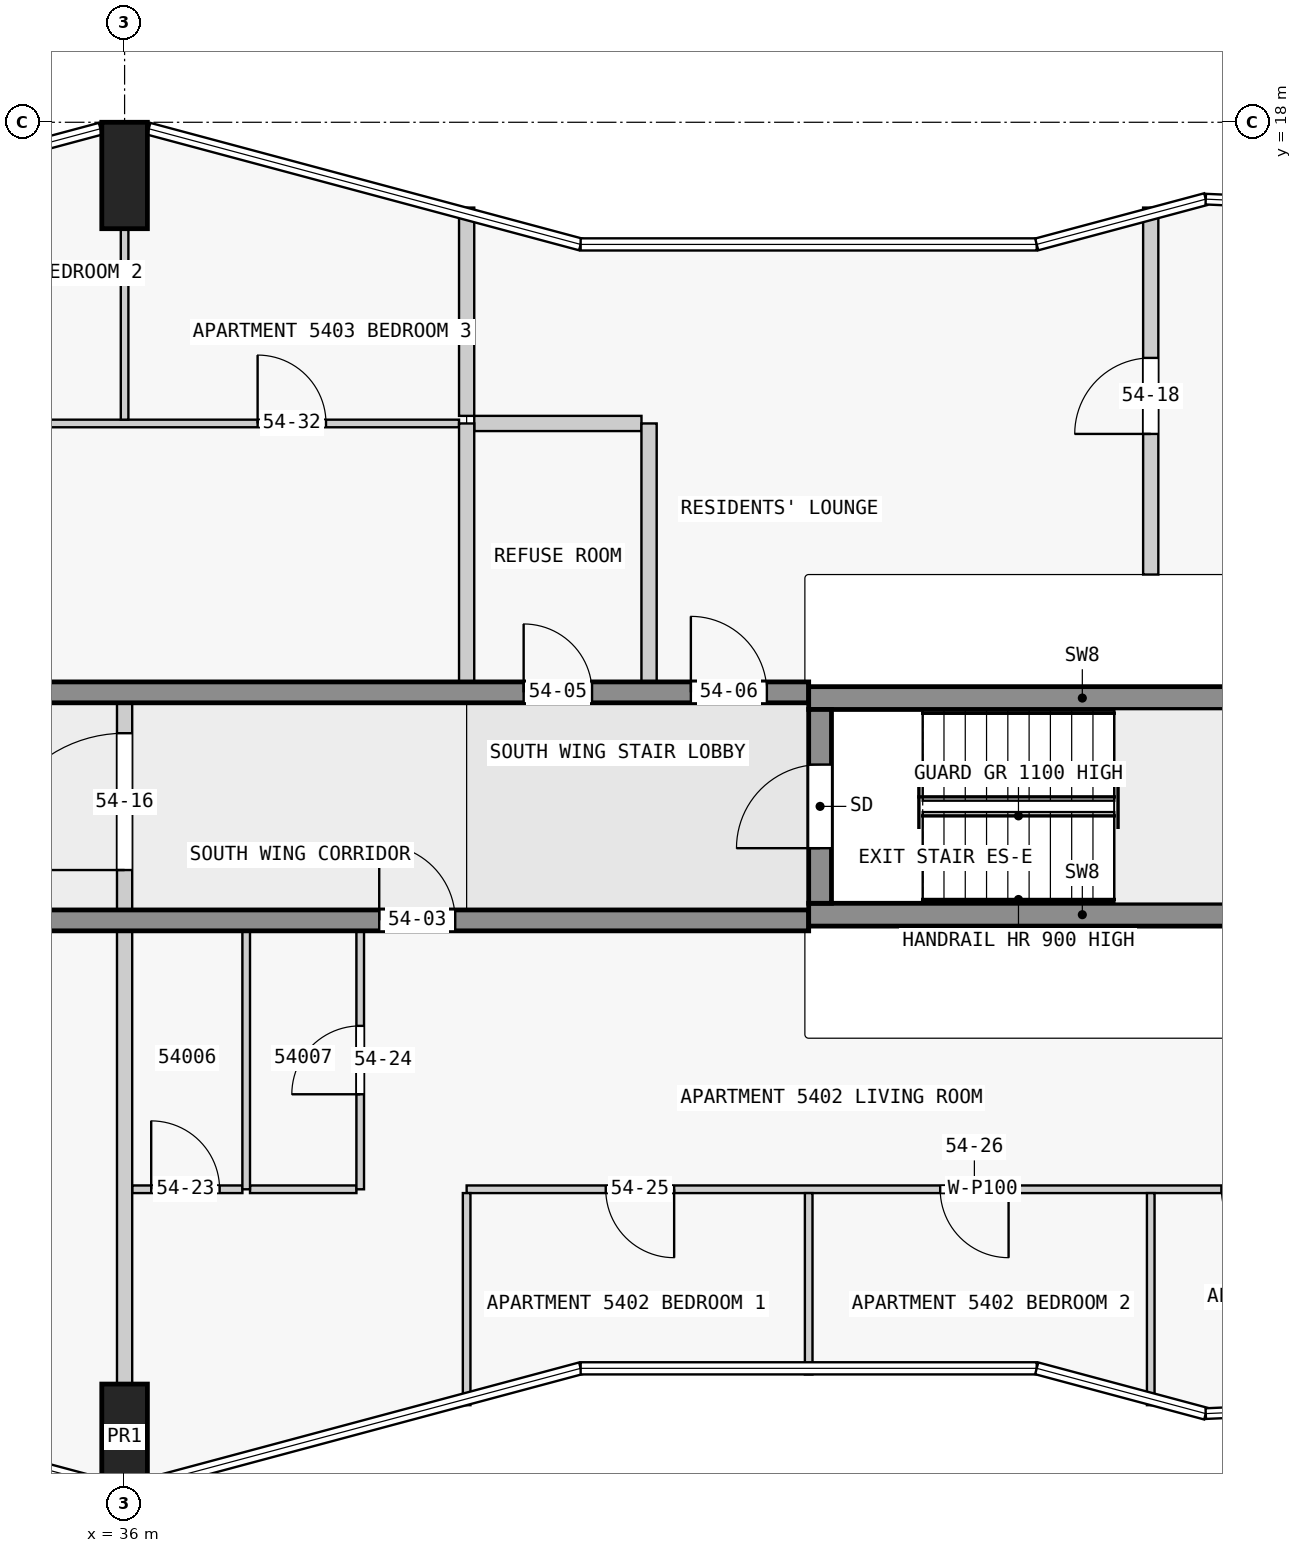
"""IFC4 building model, lengths in metres.
Left out: names, types, materials, properties, quantities, classifications, styles, units other than length and angle.
Written with IfcOpenShell. Run it as: python <this file> out.ifc"""

import sys

from ifc_helpers import new_model, si_unit, direction, frame, frame_2d, origin, origin_2d, place, context, subcontext, project, spatial, rectangle, extrude, element, fill, save


model = new_model("IFC4")
c1 = context("Model", 3, precision=1e-05, world=origin(), true_north=direction((0.0, 1.0)))
c2 = subcontext(c1, "Body", "Model", "MODEL_VIEW")
j1 = project(units=[si_unit("LENGTHUNIT", "METRE"), si_unit("PLANEANGLEUNIT", "RADIAN")], contexts=[c1])
p1 = place(None, origin())
s1 = spatial("IfcSite", under=j1, at=p1, CompositionType="ELEMENT")
p2 = place(p1, origin())
s2 = spatial("IfcBuilding", under=s1, at=p2, CompositionType="ELEMENT")
p3 = place(p2, frame((0.0, 0.0, 208.4)))
s3 = spatial("IfcBuildingStorey", under=s2, at=p3, CompositionType="ELEMENT", Elevation=208.4)
for number, where, z_axis, x_axis in (
    (1, (36.0, 0.7, 0.0), (0.0, 0.0, 1.0), (1.0, 0.0, 0.0)),
    (2, (36.0, 17.3, 0.0), (0.0, 0.0, 1.0), (1.0, 0.0, 0.0)),
):
    element("IfcColumn", number, at=place(p3, frame(where, z_axis=z_axis, x_axis=x_axis)), inside=s3, PredefinedType="COLUMN", context=c2, shape_type="SweptSolid", body=[
        extrude(rectangle(XDim=0.6, YDim=1.4, at=origin_2d()), origin(), (0.0, 0.0, 1.0), 3.5),
    ])
p4 = place(p3, frame((45.15, 7.725, 0.0), z_axis=(0.0, 0.0, 1.0), x_axis=(0.0, 1.0, 0.0)))
e3 = element("IfcWall", 3, at=p4, inside=s3, PredefinedType="SHEAR", context=c2, shape_type="SweptSolid", body=[
    extrude(rectangle(XDim=2.55, YDim=0.3, at=frame_2d((1.275, 0.0))), origin(), (0.0, 0.0, 1.0), 3.5),
])
p5 = place(p4, frame((0.725, 0.0, 0.0)))
e4 = element("IfcOpeningElement", 4, at=p5, cuts=e3, PredefinedType="OPENING", context=c2, shape_type="SweptSolid", body=[
    extrude(rectangle(XDim=1.1, YDim=2.1, at=frame_2d((0.55, 1.05))), frame((0.0, 0.16, 0.0), z_axis=(0.0, -1.0, 0.0), x_axis=(1.0, 0.0, 0.0)), (0.0, 0.0, 1.0), 0.32),
])
for number, where, z_axis, x_axis in (
    (5, (45.0, 7.575, 0.0), (0.0, 0.0, 1.0), (1.0, 0.0, 0.0)),
    (6, (45.0, 10.425, 0.0), (0.0, 0.0, 1.0), (1.0, 0.0, 0.0)),
):
    element("IfcWall", number, at=place(p3, frame(where, z_axis=z_axis, x_axis=x_axis)), inside=s3, PredefinedType="SHEAR", context=c2, shape_type="SweptSolid", body=[
        extrude(rectangle(XDim=7.2, YDim=0.3, at=frame_2d((3.6, 0.0))), origin(), (0.0, 0.0, 1.0), 3.5),
    ])
p6 = place(p3, frame((22.5, 7.5, 0.0), z_axis=(0.0, 0.0, 1.0), x_axis=(1.0, 0.0, 0.0)))
e7 = element("IfcWall", 7, at=p6, inside=s3, PredefinedType="SHEAR", context=c2, shape_type="SweptSolid", body=[
    extrude(rectangle(XDim=22.5, YDim=0.275, at=frame_2d((11.25, 0.0))), origin(), (0.0, 0.0, 1.0), 3.25),
])
p7 = place(p6, frame((4.05, 0.0, 0.0)))
e8 = element("IfcOpeningElement", 8, at=p7, cuts=e7, PredefinedType="OPENING", context=c2, shape_type="SweptSolid", body=[
    extrude(rectangle(XDim=1.0, YDim=2.1, at=frame_2d((0.5, 1.05))), frame((0.0, 0.147, 0.0), z_axis=(0.0, -1.0, 0.0), x_axis=(1.0, 0.0, 0.0)), (0.0, 0.0, 1.0), 0.295),
])
p8 = place(p6, frame((10.35, 0.0, 0.0)))
e9 = element("IfcOpeningElement", 9, at=p8, cuts=e7, PredefinedType="OPENING", context=c2, shape_type="SweptSolid", body=[
    extrude(rectangle(XDim=1.8, YDim=2.1, at=frame_2d((0.9, 1.05))), frame((0.0, 0.147, 0.0), z_axis=(0.0, -1.0, 0.0), x_axis=(1.0, 0.0, 0.0)), (0.0, 0.0, 1.0), 0.295),
])
p9 = place(p6, frame((16.85, 0.0, 0.0)))
e10 = element("IfcOpeningElement", 10, at=p9, cuts=e7, PredefinedType="OPENING", context=c2, shape_type="SweptSolid", body=[
    extrude(rectangle(XDim=1.0, YDim=2.1, at=frame_2d((0.5, 1.05))), frame((0.0, 0.147, 0.0), z_axis=(0.0, -1.0, 0.0), x_axis=(1.0, 0.0, 0.0)), (0.0, 0.0, 1.0), 0.295),
])
p10 = place(p3, frame((22.5, 10.5, 0.0), z_axis=(0.0, 0.0, 1.0), x_axis=(1.0, 0.0, 0.0)))
e11 = element("IfcWall", 11, at=p10, inside=s3, PredefinedType="SHEAR", context=c2, shape_type="SweptSolid", body=[
    extrude(rectangle(XDim=22.5, YDim=0.275, at=frame_2d((11.25, 0.0))), origin(), (0.0, 0.0, 1.0), 3.25),
])
p11 = place(p10, frame((7.75, 0.0, 0.0)))
e12 = element("IfcOpeningElement", 12, at=p11, cuts=e11, PredefinedType="OPENING", context=c2, shape_type="SweptSolid", body=[
    extrude(rectangle(XDim=1.0, YDim=2.1, at=frame_2d((0.5, 1.05))), frame((0.0, 0.147, 0.0), z_axis=(0.0, -1.0, 0.0), x_axis=(1.0, 0.0, 0.0)), (0.0, 0.0, 1.0), 0.295),
])
p12 = place(p10, frame((18.75, 0.0, 0.0)))
e13 = element("IfcOpeningElement", 13, at=p12, cuts=e11, PredefinedType="OPENING", context=c2, shape_type="SweptSolid", body=[
    extrude(rectangle(XDim=0.9, YDim=2.1, at=frame_2d((0.45, 1.05))), frame((0.0, 0.147, 0.0), z_axis=(0.0, -1.0, 0.0), x_axis=(1.0, 0.0, 0.0)), (0.0, 0.0, 1.0), 0.295),
])
p13 = place(p10, frame((20.95, 0.0, 0.0)))
e14 = element("IfcOpeningElement", 14, at=p13, cuts=e11, PredefinedType="OPENING", context=c2, shape_type="SweptSolid", body=[
    extrude(rectangle(XDim=1.0, YDim=2.1, at=frame_2d((0.5, 1.05))), frame((0.0, 0.147, 0.0), z_axis=(0.0, -1.0, 0.0), x_axis=(1.0, 0.0, 0.0)), (0.0, 0.0, 1.0), 0.295),
])
p14 = place(p3, frame((54.08, 3.962, 0.0), z_axis=(0.0, 0.0, 1.0), x_axis=(-1.0, 0.0, 0.0)))
e15 = element("IfcWall", 15, at=p14, inside=s3, PredefinedType="PARTITIONING", context=c2, shape_type="SweptSolid", body=[
    extrude(rectangle(XDim=13.58, YDim=0.1, at=frame_2d((6.79, 0.0))), origin(), (0.0, 0.0, 1.0), 3.25),
])
p15 = place(p14, frame((10.85, 0.0, 0.0)))
e16 = element("IfcOpeningElement", 16, at=p15, cuts=e15, PredefinedType="OPENING", context=c2, shape_type="SweptSolid", body=[
    extrude(rectangle(XDim=0.9, YDim=2.1, at=frame_2d((0.45, 1.05))), frame((0.0, 0.06, 0.0), z_axis=(0.0, -1.0, 0.0), x_axis=(1.0, 0.0, 0.0)), (0.0, 0.0, 1.0), 0.12),
])
p16 = place(p14, frame((6.45, 0.0, 0.0)))
e17 = element("IfcOpeningElement", 17, at=p16, cuts=e15, PredefinedType="OPENING", context=c2, shape_type="SweptSolid", body=[
    extrude(rectangle(XDim=0.9, YDim=2.1, at=frame_2d((0.45, 1.05))), frame((0.0, 0.06, 0.0), z_axis=(0.0, -1.0, 0.0), x_axis=(1.0, 0.0, 0.0)), (0.0, 0.0, 1.0), 0.12),
])
p17 = place(p14, frame((2.75, 0.0, 0.0)))
e18 = element("IfcOpeningElement", 18, at=p17, cuts=e15, PredefinedType="OPENING", context=c2, shape_type="SweptSolid", body=[
    extrude(rectangle(XDim=0.9, YDim=2.1, at=frame_2d((0.45, 1.05))), frame((0.0, 0.06, 0.0), z_axis=(0.0, -1.0, 0.0), x_axis=(1.0, 0.0, 0.0)), (0.0, 0.0, 1.0), 0.12),
])
p18 = place(p3, frame((36.1, 3.962, 0.0), z_axis=(0.0, 0.0, 1.0), x_axis=(1.0, 0.0, 0.0)))
e19 = element("IfcWall", 19, at=p18, inside=s3, PredefinedType="PARTITIONING", context=c2, shape_type="SweptSolid", body=[
    extrude(rectangle(XDim=1.45, YDim=0.1, at=frame_2d((0.725, 0.0))), origin(), (0.0, 0.0, 1.0), 3.25),
])
p19 = place(p18, frame((0.25, 0.0, 0.0)))
e20 = element("IfcOpeningElement", 20, at=p19, cuts=e19, PredefinedType="OPENING", context=c2, shape_type="SweptSolid", body=[
    extrude(rectangle(XDim=0.9, YDim=2.1, at=frame_2d((0.45, 1.05))), frame((0.0, 0.06, 0.0), z_axis=(0.0, -1.0, 0.0), x_axis=(1.0, 0.0, 0.0)), (0.0, 0.0, 1.0), 0.12),
])
p20 = place(p3, frame((37.65, 3.962, 0.0), z_axis=(0.0, 0.0, 1.0), x_axis=(1.0, 0.0, 0.0)))
e21 = element("IfcWall", 21, at=p20, inside=s3, PredefinedType="PARTITIONING", context=c2, shape_type="SweptSolid", body=[
    extrude(rectangle(XDim=1.4, YDim=0.1, at=frame_2d((0.7, 0.0))), origin(), (0.0, 0.0, 1.0), 3.25),
])
p21 = place(p3, frame((27.0, 14.038, 0.0), z_axis=(0.0, 0.0, 1.0), x_axis=(1.0, 0.0, 0.0)))
e22 = element("IfcWall", 22, at=p21, inside=s3, PredefinedType="PARTITIONING", context=c2, shape_type="SweptSolid", body=[
    extrude(rectangle(XDim=13.4, YDim=0.1, at=frame_2d((6.7, 0.0))), origin(), (0.0, 0.0, 1.0), 3.25),
])
p22 = place(p21, frame((1.85, 0.0, 0.0)))
e23 = element("IfcOpeningElement", 23, at=p22, cuts=e22, PredefinedType="OPENING", context=c2, shape_type="SweptSolid", body=[
    extrude(rectangle(XDim=0.9, YDim=2.1, at=frame_2d((0.45, 1.05))), frame((0.0, 0.06, 0.0), z_axis=(0.0, -1.0, 0.0), x_axis=(1.0, 0.0, 0.0)), (0.0, 0.0, 1.0), 0.12),
])
p23 = place(p21, frame((6.35, 0.0, 0.0)))
e24 = element("IfcOpeningElement", 24, at=p23, cuts=e22, PredefinedType="OPENING", context=c2, shape_type="SweptSolid", body=[
    extrude(rectangle(XDim=0.9, YDim=2.1, at=frame_2d((0.45, 1.05))), frame((0.0, 0.06, 0.0), z_axis=(0.0, -1.0, 0.0), x_axis=(1.0, 0.0, 0.0)), (0.0, 0.0, 1.0), 0.12),
])
p24 = place(p21, frame((10.75, 0.0, 0.0)))
e25 = element("IfcOpeningElement", 25, at=p24, cuts=e22, PredefinedType="OPENING", context=c2, shape_type="SweptSolid", body=[
    extrude(rectangle(XDim=0.9, YDim=2.1, at=frame_2d((0.45, 1.05))), frame((0.0, 0.06, 0.0), z_axis=(0.0, -1.0, 0.0), x_axis=(1.0, 0.0, 0.0)), (0.0, 0.0, 1.0), 0.12),
])
p25 = place(p3, frame((42.8, 14.038, 0.0), z_axis=(0.0, 0.0, 1.0), x_axis=(-1.0, 0.0, 0.0)))
e26 = element("IfcWall", 26, at=p25, inside=s3, PredefinedType="PARTITIONING", context=c2, shape_type="SweptSolid", body=[
    extrude(rectangle(XDim=2.2, YDim=0.2, at=frame_2d((1.1, 0.0))), origin(), (0.0, 0.0, 1.0), 3.25),
])
p26 = place(p3, frame((36.0, 14.087, 0.0), z_axis=(0.0, 0.0, 1.0), x_axis=(0.0, 1.0, 0.0)))
e27 = element("IfcWall", 27, at=p26, inside=s3, PredefinedType="PARTITIONING", context=c2, shape_type="SweptSolid", body=[
    extrude(rectangle(XDim=2.513, YDim=0.1, at=frame_2d((1.256, 0.0))), origin(), (0.0, 0.0, 1.0), 3.25),
])
p27 = place(p3, frame((36.0, 1.4, 0.0), z_axis=(0.0, 0.0, 1.0), x_axis=(0.0, 1.0, 0.0)))
e28 = element("IfcWall", 28, at=p27, inside=s3, PredefinedType="PARTITIONING", context=c2, shape_type="SweptSolid", body=[
    extrude(rectangle(XDim=5.963, YDim=0.2, at=frame_2d((2.981, 0.0))), origin(), (0.0, 0.0, 1.0), 3.25),
])
p28 = place(p3, frame((37.6, 3.962, 0.0), z_axis=(0.0, 0.0, 1.0), x_axis=(0.0, 1.0, 0.0)))
e29 = element("IfcWall", 29, at=p28, inside=s3, PredefinedType="PARTITIONING", context=c2, shape_type="SweptSolid", body=[
    extrude(rectangle(XDim=3.4, YDim=0.1, at=frame_2d((1.7, 0.0))), origin(), (0.0, 0.0, 1.0), 3.25),
])
p29 = place(p3, frame((39.1, 3.962, 0.0), z_axis=(0.0, 0.0, 1.0), x_axis=(0.0, 1.0, 0.0)))
e30 = element("IfcWall", 30, at=p29, inside=s3, PredefinedType="PARTITIONING", context=c2, shape_type="SweptSolid", body=[
    extrude(rectangle(XDim=3.4, YDim=0.1, at=frame_2d((1.7, 0.0))), origin(), (0.0, 0.0, 1.0), 3.25),
])
p30 = place(p29, frame((1.25, 0.0, 0.0)))
e31 = element("IfcOpeningElement", 31, at=p30, cuts=e30, PredefinedType="OPENING", context=c2, shape_type="SweptSolid", body=[
    extrude(rectangle(XDim=0.9, YDim=2.1, at=frame_2d((0.45, 1.05))), frame((0.0, 0.06, 0.0), z_axis=(0.0, -1.0, 0.0), x_axis=(1.0, 0.0, 0.0)), (0.0, 0.0, 1.0), 0.12),
])
p31 = place(p3, frame((40.5, 3.913, 0.0), z_axis=(0.0, 0.0, 1.0), x_axis=(0.0, -1.0, 0.0)))
e32 = element("IfcWall", 32, at=p31, inside=s3, PredefinedType="PARTITIONING", context=c2, shape_type="SweptSolid", body=[
    extrude(rectangle(XDim=2.79, YDim=0.1, at=frame_2d((1.395, 0.0))), origin(), (0.0, 0.0, 1.0), 3.25),
])
p32 = place(p3, frame((40.5, 14.038, 0.0), z_axis=(0.0, 0.0, 1.0), x_axis=(0.0, -1.0, 0.0)))
e33 = element("IfcWall", 33, at=p32, inside=s3, PredefinedType="PARTITIONING", context=c2, shape_type="SweptSolid", body=[
    extrude(rectangle(XDim=3.4, YDim=0.2, at=frame_2d((1.7, 0.0))), origin(), (0.0, 0.0, 1.0), 3.25),
])
p33 = place(p3, frame((40.5, 14.137, 0.0), z_axis=(0.0, 0.0, 1.0), x_axis=(0.0, 1.0, 0.0)))
e34 = element("IfcWall", 34, at=p33, inside=s3, PredefinedType="PARTITIONING", context=c2, shape_type="SweptSolid", body=[
    extrude(rectangle(XDim=2.74, YDim=0.2, at=frame_2d((1.37, 0.0))), origin(), (0.0, 0.0, 1.0), 3.25),
])
p34 = place(p3, frame((42.9, 10.637, 0.0), z_axis=(0.0, 0.0, 1.0), x_axis=(0.0, 1.0, 0.0)))
e35 = element("IfcWall", 35, at=p34, inside=s3, PredefinedType="PARTITIONING", context=c2, shape_type="SweptSolid", body=[
    extrude(rectangle(XDim=3.4, YDim=0.2, at=frame_2d((1.7, 0.0))), origin(), (0.0, 0.0, 1.0), 3.25),
])
p35 = place(p3, frame((45.0, 1.527, 0.0), z_axis=(0.0, 0.0, 1.0), x_axis=(0.0, 1.0, 0.0)))
e36 = element("IfcWall", 36, at=p35, inside=s3, PredefinedType="PARTITIONING", context=c2, shape_type="SweptSolid", body=[
    extrude(rectangle(XDim=2.386, YDim=0.1, at=frame_2d((1.193, 0.0))), origin(), (0.0, 0.0, 1.0), 3.25),
])
p36 = place(p3, frame((49.5, 1.122, 0.0), z_axis=(0.0, 0.0, 1.0), x_axis=(0.0, 1.0, 0.0)))
e37 = element("IfcWall", 37, at=p36, inside=s3, PredefinedType="PARTITIONING", context=c2, shape_type="SweptSolid", body=[
    extrude(rectangle(XDim=2.79, YDim=0.1, at=frame_2d((1.395, 0.0))), origin(), (0.0, 0.0, 1.0), 3.25),
])
p37 = place(p3, frame((49.5, 12.05, 0.0), z_axis=(0.0, 0.0, 1.0), x_axis=(0.0, 1.0, 0.0)))
e38 = element("IfcWall", 38, at=p37, inside=s3, PredefinedType="PARTITIONING", context=c2, shape_type="SweptSolid", body=[
    extrude(rectangle(XDim=4.828, YDim=0.2, at=frame_2d((2.414, 0.0))), origin(), (0.0, 0.0, 1.0), 3.25),
])
p38 = place(p37, frame((1.85, 0.0, 0.0)))
e39 = element("IfcOpeningElement", 39, at=p38, cuts=e38, PredefinedType="OPENING", context=c2, shape_type="SweptSolid", body=[
    extrude(rectangle(XDim=1.0, YDim=2.1, at=frame_2d((0.5, 1.05))), frame((0.0, 0.11, 0.0), z_axis=(0.0, -1.0, 0.0), x_axis=(1.0, 0.0, 0.0)), (0.0, 0.0, 1.0), 0.22),
])
p39 = place(p3, frame((36.0, 7.462, 0.0), z_axis=(0.0, 0.0, 1.0), x_axis=(0.0, 1.0, 0.0)))
e40 = element("IfcWall", 40, at=p39, inside=s3, PredefinedType="PARTITIONING", context=c2, shape_type="SweptSolid", body=[
    extrude(rectangle(XDim=3.175, YDim=0.2, at=frame_2d((1.587, 0.0))), origin(), (0.0, 0.0, 1.0), 3.25),
])
p40 = place(p39, frame((0.7, 0.0, 0.0)))
e41 = element("IfcOpeningElement", 41, at=p40, cuts=e40, PredefinedType="OPENING", context=c2, shape_type="SweptSolid", body=[
    extrude(rectangle(XDim=1.8, YDim=2.1, at=frame_2d((0.9, 1.05))), frame((0.0, 0.11, 0.0), z_axis=(0.0, -1.0, 0.0), x_axis=(1.0, 0.0, 0.0)), (0.0, 0.0, 1.0), 0.22),
])
p41 = place(p5, origin())
e42 = element("IfcDoor", 42, at=p41, inside=s3, OperationType="SINGLE_SWING_LEFT", PredefinedType="DOOR", context=c2, shape_type="SweptSolid", body=[
    extrude(rectangle(XDim=1.1, YDim=2.1, at=frame_2d((0.55, 1.05))), frame((0.0, 0.025, 0.0), z_axis=(0.0, -1.0, 0.0), x_axis=(1.0, 0.0, 0.0)), (0.0, 0.0, 1.0), 0.05),
])
fill(e4, e42)
p42 = place(p9, origin())
e43 = element("IfcDoor", 43, at=p42, inside=s3, OperationType="SINGLE_SWING_RIGHT", PredefinedType="DOOR", context=c2, shape_type="SweptSolid", body=[
    extrude(rectangle(XDim=1.0, YDim=2.1, at=frame_2d((0.5, 1.05))), frame((0.0, 0.025, 0.0), z_axis=(0.0, -1.0, 0.0), x_axis=(1.0, 0.0, 0.0)), (0.0, 0.0, 1.0), 0.05),
])
fill(e10, e43)
p43 = place(p12, origin())
e44 = element("IfcDoor", 44, at=p43, inside=s3, OperationType="SINGLE_SWING_RIGHT", PredefinedType="DOOR", context=c2, shape_type="SweptSolid", body=[
    extrude(rectangle(XDim=0.9, YDim=2.1, at=frame_2d((0.45, 1.05))), frame((0.0, 0.025, 0.0), z_axis=(0.0, -1.0, 0.0), x_axis=(1.0, 0.0, 0.0)), (0.0, 0.0, 1.0), 0.05),
])
fill(e13, e44)
p44 = place(p13, origin())
e45 = element("IfcDoor", 45, at=p44, inside=s3, OperationType="SINGLE_SWING_RIGHT", PredefinedType="DOOR", context=c2, shape_type="SweptSolid", body=[
    extrude(rectangle(XDim=1.0, YDim=2.1, at=frame_2d((0.5, 1.05))), frame((0.0, 0.025, 0.0), z_axis=(0.0, -1.0, 0.0), x_axis=(1.0, 0.0, 0.0)), (0.0, 0.0, 1.0), 0.05),
])
fill(e14, e45)
p45 = place(p40, origin())
e46 = element("IfcDoor", 46, at=p45, inside=s3, OperationType="SINGLE_SWING_RIGHT", PredefinedType="DOOR", context=c2, shape_type="SweptSolid", body=[
    extrude(rectangle(XDim=1.8, YDim=2.1, at=frame_2d((0.9, 1.05))), frame((0.0, 0.025, 0.0), z_axis=(0.0, -1.0, 0.0), x_axis=(1.0, 0.0, 0.0)), (0.0, 0.0, 1.0), 0.05),
])
fill(e41, e46)
p46 = place(p38, origin())
e47 = element("IfcDoor", 47, at=p46, inside=s3, OperationType="SINGLE_SWING_LEFT", PredefinedType="DOOR", context=c2, shape_type="SweptSolid", body=[
    extrude(rectangle(XDim=1.0, YDim=2.1, at=frame_2d((0.5, 1.05))), frame((0.0, 0.025, 0.0), z_axis=(0.0, -1.0, 0.0), x_axis=(1.0, 0.0, 0.0)), (0.0, 0.0, 1.0), 0.05),
])
fill(e39, e47)
p47 = place(p19, origin())
e48 = element("IfcDoor", 48, at=p47, inside=s3, OperationType="SINGLE_SWING_LEFT", PredefinedType="DOOR", context=c2, shape_type="SweptSolid", body=[
    extrude(rectangle(XDim=0.9, YDim=2.1, at=frame_2d((0.45, 1.05))), frame((0.0, 0.025, 0.0), z_axis=(0.0, -1.0, 0.0), x_axis=(1.0, 0.0, 0.0)), (0.0, 0.0, 1.0), 0.05),
])
fill(e20, e48)
p48 = place(p30, origin())
e49 = element("IfcDoor", 49, at=p48, inside=s3, OperationType="SINGLE_SWING_LEFT", PredefinedType="DOOR", context=c2, shape_type="SweptSolid", body=[
    extrude(rectangle(XDim=0.9, YDim=2.1, at=frame_2d((0.45, 1.05))), frame((0.0, 0.025, 0.0), z_axis=(0.0, -1.0, 0.0), x_axis=(1.0, 0.0, 0.0)), (0.0, 0.0, 1.0), 0.05),
])
fill(e31, e49)
p49 = place(p15, origin())
e50 = element("IfcDoor", 50, at=p49, inside=s3, OperationType="SINGLE_SWING_RIGHT", PredefinedType="DOOR", context=c2, shape_type="SweptSolid", body=[
    extrude(rectangle(XDim=0.9, YDim=2.1, at=frame_2d((0.45, 1.05))), frame((0.0, 0.025, 0.0), z_axis=(0.0, -1.0, 0.0), x_axis=(1.0, 0.0, 0.0)), (0.0, 0.0, 1.0), 0.05),
])
fill(e16, e50)
p50 = place(p16, origin())
e51 = element("IfcDoor", 51, at=p50, inside=s3, OperationType="SINGLE_SWING_RIGHT", PredefinedType="DOOR", context=c2, shape_type="SweptSolid", body=[
    extrude(rectangle(XDim=0.9, YDim=2.1, at=frame_2d((0.45, 1.05))), frame((0.0, 0.025, 0.0), z_axis=(0.0, -1.0, 0.0), x_axis=(1.0, 0.0, 0.0)), (0.0, 0.0, 1.0), 0.05),
])
fill(e17, e51)
p51 = place(p17, origin())
e52 = element("IfcDoor", 52, at=p51, inside=s3, OperationType="SINGLE_SWING_LEFT", PredefinedType="DOOR", context=c2, shape_type="SweptSolid", body=[
    extrude(rectangle(XDim=0.9, YDim=2.1, at=frame_2d((0.45, 1.05))), frame((0.0, 0.025, 0.0), z_axis=(0.0, -1.0, 0.0), x_axis=(1.0, 0.0, 0.0)), (0.0, 0.0, 1.0), 0.05),
])
fill(e18, e52)
p52 = place(p24, origin())
e53 = element("IfcDoor", 53, at=p52, inside=s3, OperationType="SINGLE_SWING_RIGHT", PredefinedType="DOOR", context=c2, shape_type="SweptSolid", body=[
    extrude(rectangle(XDim=0.9, YDim=2.1, at=frame_2d((0.45, 1.05))), frame((0.0, 0.025, 0.0), z_axis=(0.0, -1.0, 0.0), x_axis=(1.0, 0.0, 0.0)), (0.0, 0.0, 1.0), 0.05),
])
fill(e25, e53)
save(model, sys.argv[1])
